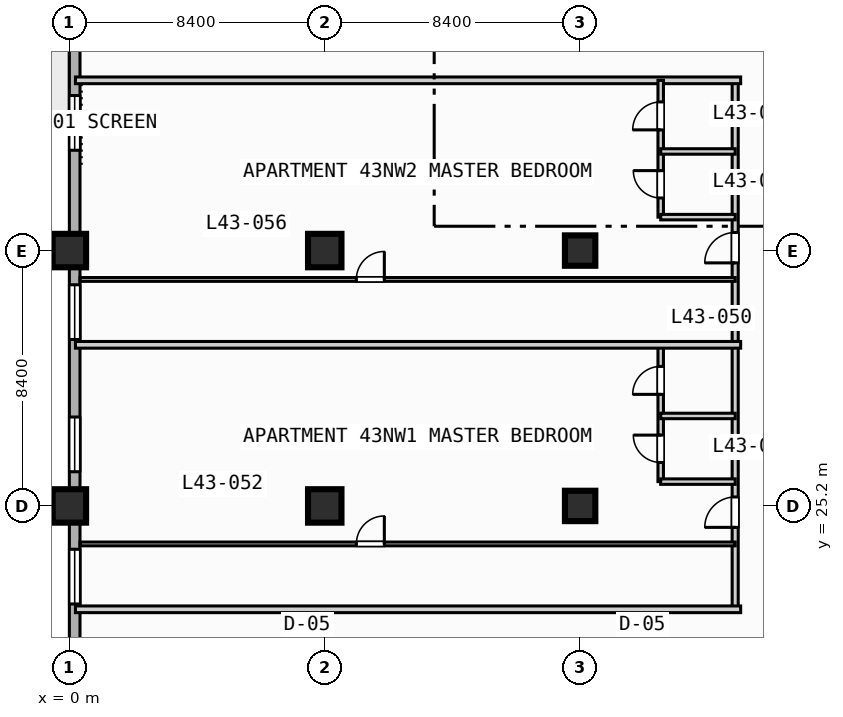
"""IFC4 building model, lengths in metres.
Left out: names, types, materials, properties, quantities, classifications, styles, units other than length and angle.
Written with IfcOpenShell. Run it as: python <this file> out.ifc"""

import sys

from ifc_helpers import new_model, si_unit, direction, frame, frame_2d, origin, origin_2d, place, context, subcontext, project, spatial, rectangle, extrude, element, fill, save


model = new_model("IFC4")
c1 = context("Model", 3, precision=1e-05, world=origin(), true_north=direction((0.0, 1.0)))
c2 = subcontext(c1, "Body", "Model", "MODEL_VIEW")
j1 = project(units=[si_unit("LENGTHUNIT", "METRE"), si_unit("PLANEANGLEUNIT", "RADIAN")], contexts=[c1])
p1 = place(None, origin())
s1 = spatial("IfcSite", under=j1, at=p1, CompositionType="ELEMENT")
p2 = place(p1, origin())
s2 = spatial("IfcBuilding", under=s1, at=p2, CompositionType="ELEMENT")
p3 = place(p2, frame((0.0, 0.0, 179.1)))
s3 = spatial("IfcBuildingStorey", under=s2, at=p3, CompositionType="ELEMENT", Elevation=179.1)
for number, where, z_axis, x_axis in (
    (1, (0.0, 25.2, 0.0), (0.0, 0.0, 1.0), (1.0, 0.0, 0.0)),
    (2, (0.0, 33.6, 0.0), (0.0, 0.0, 1.0), (1.0, 0.0, 0.0)),
    (3, (8.4, 25.2, 0.0), (0.0, 0.0, 1.0), (1.0, 0.0, 0.0)),
    (4, (8.4, 33.6, 0.0), (0.0, 0.0, 1.0), (1.0, 0.0, 0.0)),
):
    element("IfcColumn", number, at=place(p3, frame(where, z_axis=z_axis, x_axis=x_axis)), inside=s3, PredefinedType="COLUMN", context=c2, shape_type="SweptSolid", body=[
        extrude(rectangle(XDim=1.1, YDim=1.1, at=origin_2d()), origin(), (0.0, 0.0, 1.0), 3.7),
    ])
for number, where, z_axis, x_axis in (
    (5, (16.8, 25.2, 0.0), (0.0, 0.0, 1.0), (1.0, 0.0, 0.0)),
    (6, (16.8, 33.6, 0.0), (0.0, 0.0, 1.0), (1.0, 0.0, 0.0)),
):
    element("IfcColumn", number, at=place(p3, frame(where, z_axis=z_axis, x_axis=x_axis)), inside=s3, PredefinedType="COLUMN", context=c2, shape_type="SweptSolid", body=[
        extrude(rectangle(XDim=1.0, YDim=1.0, at=origin_2d()), origin(), (0.0, 0.0, 1.0), 3.7),
    ])
p4 = place(p3, frame((0.175, 3.175, 0.0), z_axis=(0.0, 0.0, 1.0), x_axis=(0.0, 1.0, 0.0)))
e7 = element("IfcWall", 7, at=p4, inside=s3, PredefinedType="STANDARD", context=c2, shape_type="SweptSolid", body=[
    extrude(rectangle(XDim=69.25, YDim=0.35, at=frame_2d((34.625, 0.0))), origin(), (0.0, 0.0, 1.0), 3.47),
])
p5 = place(p4, frame((42.325, 0.0, 0.0)))
e8 = element("IfcOpeningElement", 8, at=p5, cuts=e7, PredefinedType="OPENING", context=c2, shape_type="SweptSolid", body=[
    extrude(rectangle(XDim=1.4, YDim=2.2, at=frame_2d((0.7, 1.1))), frame((0.0, 0.185, 0.0), z_axis=(0.0, -1.0, 0.0), x_axis=(1.0, 0.0, 0.0)), (0.0, 0.0, 1.0), 0.37),
])
p6 = place(p4, frame((33.725, 0.0, 0.85)))
e9 = element("IfcOpeningElement", 9, at=p6, cuts=e7, PredefinedType="OPENING", context=c2, shape_type="SweptSolid", body=[
    extrude(rectangle(XDim=1.8, YDim=1.8, at=frame_2d((0.9, 0.9))), frame((0.0, 0.185, 0.0), z_axis=(0.0, -1.0, 0.0), x_axis=(1.0, 0.0, 0.0)), (0.0, 0.0, 1.0), 0.37),
])
p7 = place(p4, frame((18.8, 0.0, 0.85)))
e10 = element("IfcOpeningElement", 10, at=p7, cuts=e7, PredefinedType="OPENING", context=c2, shape_type="SweptSolid", body=[
    extrude(rectangle(XDim=1.8, YDim=1.8, at=frame_2d((0.9, 0.9))), frame((0.0, 0.185, 0.0), z_axis=(0.0, -1.0, 0.0), x_axis=(1.0, 0.0, 0.0)), (0.0, 0.0, 1.0), 0.37),
])
p8 = place(p4, frame((23.15, 0.0, 0.85)))
e11 = element("IfcOpeningElement", 11, at=p8, cuts=e7, PredefinedType="OPENING", context=c2, shape_type="SweptSolid", body=[
    extrude(rectangle(XDim=1.8, YDim=1.8, at=frame_2d((0.9, 0.9))), frame((0.0, 0.185, 0.0), z_axis=(0.0, -1.0, 0.0), x_axis=(1.0, 0.0, 0.0)), (0.0, 0.0, 1.0), 0.37),
])
p9 = place(p4, frame((27.5, 0.0, 0.85)))
e12 = element("IfcOpeningElement", 12, at=p9, cuts=e7, PredefinedType="OPENING", context=c2, shape_type="SweptSolid", body=[
    extrude(rectangle(XDim=1.8, YDim=1.8, at=frame_2d((0.9, 0.9))), frame((0.0, 0.185, 0.0), z_axis=(0.0, -1.0, 0.0), x_axis=(1.0, 0.0, 0.0)), (0.0, 0.0, 1.0), 0.37),
])
p10 = place(p3, frame((21.9, 21.8, 0.0), z_axis=(0.0, 0.0, 1.0), x_axis=(0.0, 1.0, 0.0)))
e13 = element("IfcWall", 13, at=p10, inside=s3, PredefinedType="PARTITIONING", context=c2, shape_type="SweptSolid", body=[
    extrude(rectangle(XDim=17.4, YDim=0.2, at=frame_2d((8.7, 0.0))), origin(), (0.0, 0.0, 1.0), 3.47),
])
p11 = place(p10, frame((2.695, 0.0, 0.0)))
e14 = element("IfcOpeningElement", 14, at=p11, cuts=e13, PredefinedType="OPENING", context=c2, shape_type="SweptSolid", body=[
    extrude(rectangle(XDim=1.0, YDim=2.15, at=frame_2d((0.5, 1.075))), frame((0.0, 0.11, 0.0), z_axis=(0.0, -1.0, 0.0), x_axis=(1.0, 0.0, 0.0)), (0.0, 0.0, 1.0), 0.22),
])
p12 = place(p10, frame((11.395, 0.0, 0.0)))
e15 = element("IfcOpeningElement", 15, at=p12, cuts=e13, PredefinedType="OPENING", context=c2, shape_type="SweptSolid", body=[
    extrude(rectangle(XDim=1.0, YDim=2.15, at=frame_2d((0.5, 1.075))), frame((0.0, 0.11, 0.0), z_axis=(0.0, -1.0, 0.0), x_axis=(1.0, 0.0, 0.0)), (0.0, 0.0, 1.0), 0.22),
])
p13 = place(p3, frame((0.2, 21.8, 0.0), z_axis=(0.0, 0.0, 1.0), x_axis=(1.0, 0.0, 0.0)))
e16 = element("IfcWall", 16, at=p13, inside=s3, PredefinedType="PARTITIONING", context=c2, shape_type="SweptSolid", body=[
    extrude(rectangle(XDim=21.88, YDim=0.22, at=frame_2d((10.94, 0.0))), origin(), (0.0, 0.0, 1.0), 3.47),
])
p14 = place(p3, frame((19.45, 26.0, 0.0), z_axis=(0.0, 0.0, 1.0), x_axis=(0.0, 1.0, 0.0)))
e17 = element("IfcWall", 17, at=p14, inside=s3, PredefinedType="PLUMBINGWALL", context=c2, shape_type="SweptSolid", body=[
    extrude(rectangle(XDim=4.5, YDim=0.18, at=frame_2d((2.25, 0.0))), origin(), (0.0, 0.0, 1.0), 3.47),
])
p15 = place(p14, frame((0.63, 0.0, 0.0)))
e18 = element("IfcOpeningElement", 18, at=p15, cuts=e17, PredefinedType="OPENING", context=c2, shape_type="SweptSolid", body=[
    extrude(rectangle(XDim=0.9, YDim=2.1, at=frame_2d((0.45, 1.05))), frame((0.0, 0.1, 0.0), z_axis=(0.0, -1.0, 0.0), x_axis=(1.0, 0.0, 0.0)), (0.0, 0.0, 1.0), 0.2),
])
p16 = place(p14, frame((2.87, 0.0, 0.0)))
e19 = element("IfcOpeningElement", 19, at=p16, cuts=e17, PredefinedType="OPENING", context=c2, shape_type="SweptSolid", body=[
    extrude(rectangle(XDim=0.92, YDim=2.1, at=frame_2d((0.46, 1.05))), frame((0.0, 0.1, 0.0), z_axis=(0.0, -1.0, 0.0), x_axis=(1.0, 0.0, 0.0)), (0.0, 0.0, 1.0), 0.2),
])
for number, where, z_axis, x_axis in (
    (20, (19.45, 26.0, 0.0), (0.0, 0.0, 1.0), (1.0, 0.0, 0.0)),
    (21, (19.45, 28.16, 0.0), (0.0, 0.0, 1.0), (1.0, 0.0, 0.0)),
):
    element("IfcWall", number, at=place(p3, frame(where, z_axis=z_axis, x_axis=x_axis)), inside=s3, PredefinedType="PLUMBINGWALL", context=c2, shape_type="SweptSolid", body=[
        extrude(rectangle(XDim=2.45, YDim=0.18, at=frame_2d((1.225, 0.0))), origin(), (0.0, 0.0, 1.0), 3.47),
    ])
p17 = place(p3, frame((0.35, 23.95, 0.0), z_axis=(0.0, 0.0, 1.0), x_axis=(1.0, 0.0, 0.0)))
e22 = element("IfcWall", 22, at=p17, inside=s3, PredefinedType="PARTITIONING", context=c2, shape_type="SweptSolid", body=[
    extrude(rectangle(XDim=21.55, YDim=0.125, at=frame_2d((10.775, 0.0))), origin(), (0.0, 0.0, 1.0), 3.47),
])
p18 = place(p17, frame((9.09, 0.0, 0.0)))
e23 = element("IfcOpeningElement", 23, at=p18, cuts=e22, PredefinedType="OPENING", context=c2, shape_type="SweptSolid", body=[
    extrude(rectangle(XDim=0.92, YDim=2.1, at=frame_2d((0.46, 1.05))), frame((0.0, 0.073, 0.0), z_axis=(0.0, -1.0, 0.0), x_axis=(1.0, 0.0, 0.0)), (0.0, 0.0, 1.0), 0.145),
])
for number, where, z_axis, x_axis in (
    (24, (0.2, 30.5, 0.0), (0.0, 0.0, 1.0), (1.0, 0.0, 0.0)),
    (25, (0.2, 39.2, 0.0), (0.0, 0.0, 1.0), (1.0, 0.0, 0.0)),
):
    element("IfcWall", number, at=place(p3, frame(where, z_axis=z_axis, x_axis=x_axis)), inside=s3, PredefinedType="PARTITIONING", context=c2, shape_type="SweptSolid", body=[
        extrude(rectangle(XDim=21.88, YDim=0.22, at=frame_2d((10.94, 0.0))), origin(), (0.0, 0.0, 1.0), 3.47),
    ])
p19 = place(p3, frame((19.45, 34.7, 0.0), z_axis=(0.0, 0.0, 1.0), x_axis=(0.0, 1.0, 0.0)))
e26 = element("IfcWall", 26, at=p19, inside=s3, PredefinedType="PLUMBINGWALL", context=c2, shape_type="SweptSolid", body=[
    extrude(rectangle(XDim=4.5, YDim=0.18, at=frame_2d((2.25, 0.0))), origin(), (0.0, 0.0, 1.0), 3.47),
])
p20 = place(p19, frame((0.63, 0.0, 0.0)))
e27 = element("IfcOpeningElement", 27, at=p20, cuts=e26, PredefinedType="OPENING", context=c2, shape_type="SweptSolid", body=[
    extrude(rectangle(XDim=0.9, YDim=2.1, at=frame_2d((0.45, 1.05))), frame((0.0, 0.1, 0.0), z_axis=(0.0, -1.0, 0.0), x_axis=(1.0, 0.0, 0.0)), (0.0, 0.0, 1.0), 0.2),
])
p21 = place(p19, frame((2.87, 0.0, 0.0)))
e28 = element("IfcOpeningElement", 28, at=p21, cuts=e26, PredefinedType="OPENING", context=c2, shape_type="SweptSolid", body=[
    extrude(rectangle(XDim=0.92, YDim=2.1, at=frame_2d((0.46, 1.05))), frame((0.0, 0.1, 0.0), z_axis=(0.0, -1.0, 0.0), x_axis=(1.0, 0.0, 0.0)), (0.0, 0.0, 1.0), 0.2),
])
for number, where, z_axis, x_axis in (
    (29, (19.45, 34.7, 0.0), (0.0, 0.0, 1.0), (1.0, 0.0, 0.0)),
    (30, (19.45, 36.86, 0.0), (0.0, 0.0, 1.0), (1.0, 0.0, 0.0)),
):
    element("IfcWall", number, at=place(p3, frame(where, z_axis=z_axis, x_axis=x_axis)), inside=s3, PredefinedType="PLUMBINGWALL", context=c2, shape_type="SweptSolid", body=[
        extrude(rectangle(XDim=2.45, YDim=0.18, at=frame_2d((1.225, 0.0))), origin(), (0.0, 0.0, 1.0), 3.47),
    ])
p22 = place(p3, frame((0.35, 32.65, 0.0), z_axis=(0.0, 0.0, 1.0), x_axis=(1.0, 0.0, 0.0)))
e31 = element("IfcWall", 31, at=p22, inside=s3, PredefinedType="PARTITIONING", context=c2, shape_type="SweptSolid", body=[
    extrude(rectangle(XDim=21.55, YDim=0.125, at=frame_2d((10.775, 0.0))), origin(), (0.0, 0.0, 1.0), 3.47),
])
p23 = place(p22, frame((9.09, 0.0, 0.0)))
e32 = element("IfcOpeningElement", 32, at=p23, cuts=e31, PredefinedType="OPENING", context=c2, shape_type="SweptSolid", body=[
    extrude(rectangle(XDim=0.92, YDim=2.1, at=frame_2d((0.46, 1.05))), frame((0.0, 0.073, 0.0), z_axis=(0.0, -1.0, 0.0), x_axis=(1.0, 0.0, 0.0)), (0.0, 0.0, 1.0), 0.145),
])
p24 = place(p6, origin())
e33 = element("IfcWindow", 33, at=p24, inside=s3, PartitioningType="SINGLE_PANEL", PredefinedType="WINDOW", context=c2, shape_type="SweptSolid", body=[
    extrude(rectangle(XDim=1.8, YDim=1.8, at=frame_2d((0.9, 0.9))), frame((0.0, 0.03, 0.0), z_axis=(0.0, -1.0, 0.0), x_axis=(1.0, 0.0, 0.0)), (0.0, 0.0, 1.0), 0.06),
])
fill(e9, e33)
p25 = place(p7, origin())
e34 = element("IfcWindow", 34, at=p25, inside=s3, PartitioningType="SINGLE_PANEL", PredefinedType="WINDOW", context=c2, shape_type="SweptSolid", body=[
    extrude(rectangle(XDim=1.8, YDim=1.8, at=frame_2d((0.9, 0.9))), frame((0.0, 0.03, 0.0), z_axis=(0.0, -1.0, 0.0), x_axis=(1.0, 0.0, 0.0)), (0.0, 0.0, 1.0), 0.06),
])
fill(e10, e34)
p26 = place(p8, origin())
e35 = element("IfcWindow", 35, at=p26, inside=s3, PartitioningType="SINGLE_PANEL", PredefinedType="WINDOW", context=c2, shape_type="SweptSolid", body=[
    extrude(rectangle(XDim=1.8, YDim=1.8, at=frame_2d((0.9, 0.9))), frame((0.0, 0.03, 0.0), z_axis=(0.0, -1.0, 0.0), x_axis=(1.0, 0.0, 0.0)), (0.0, 0.0, 1.0), 0.06),
])
fill(e11, e35)
p27 = place(p9, origin())
e36 = element("IfcWindow", 36, at=p27, inside=s3, PartitioningType="SINGLE_PANEL", PredefinedType="WINDOW", context=c2, shape_type="SweptSolid", body=[
    extrude(rectangle(XDim=1.8, YDim=1.8, at=frame_2d((0.9, 0.9))), frame((0.0, 0.03, 0.0), z_axis=(0.0, -1.0, 0.0), x_axis=(1.0, 0.0, 0.0)), (0.0, 0.0, 1.0), 0.06),
])
fill(e12, e36)
p28 = place(p11, origin())
e37 = element("IfcDoor", 37, at=p28, inside=s3, OperationType="SINGLE_SWING_LEFT", PredefinedType="DOOR", context=c2, shape_type="SweptSolid", body=[
    extrude(rectangle(XDim=1.0, YDim=2.15, at=frame_2d((0.5, 1.075))), frame((0.0, 0.025, 0.0), z_axis=(0.0, -1.0, 0.0), x_axis=(1.0, 0.0, 0.0)), (0.0, 0.0, 1.0), 0.05),
])
fill(e14, e37)
p29 = place(p12, origin())
e38 = element("IfcDoor", 38, at=p29, inside=s3, OperationType="SINGLE_SWING_LEFT", PredefinedType="DOOR", context=c2, shape_type="SweptSolid", body=[
    extrude(rectangle(XDim=1.0, YDim=2.15, at=frame_2d((0.5, 1.075))), frame((0.0, 0.025, 0.0), z_axis=(0.0, -1.0, 0.0), x_axis=(1.0, 0.0, 0.0)), (0.0, 0.0, 1.0), 0.05),
])
fill(e15, e38)
p30 = place(p15, origin())
e39 = element("IfcDoor", 39, at=p30, inside=s3, OperationType="SINGLE_SWING_RIGHT", PredefinedType="DOOR", context=c2, shape_type="SweptSolid", body=[
    extrude(rectangle(XDim=0.9, YDim=2.1, at=frame_2d((0.45, 1.05))), frame((0.0, 0.025, 0.0), z_axis=(0.0, -1.0, 0.0), x_axis=(1.0, 0.0, 0.0)), (0.0, 0.0, 1.0), 0.05),
])
fill(e18, e39)
p31 = place(p16, origin())
e40 = element("IfcDoor", 40, at=p31, inside=s3, OperationType="SINGLE_SWING_LEFT", PredefinedType="DOOR", context=c2, shape_type="SweptSolid", body=[
    extrude(rectangle(XDim=0.92, YDim=2.1, at=frame_2d((0.46, 1.05))), frame((0.0, 0.025, 0.0), z_axis=(0.0, -1.0, 0.0), x_axis=(1.0, 0.0, 0.0)), (0.0, 0.0, 1.0), 0.05),
])
fill(e19, e40)
p32 = place(p18, origin())
e41 = element("IfcDoor", 41, at=p32, inside=s3, OperationType="SINGLE_SWING_RIGHT", PredefinedType="DOOR", context=c2, shape_type="SweptSolid", body=[
    extrude(rectangle(XDim=0.92, YDim=2.1, at=frame_2d((0.46, 1.05))), frame((0.0, 0.025, 0.0), z_axis=(0.0, -1.0, 0.0), x_axis=(1.0, 0.0, 0.0)), (0.0, 0.0, 1.0), 0.05),
])
fill(e23, e41)
p33 = place(p20, origin())
e42 = element("IfcDoor", 42, at=p33, inside=s3, OperationType="SINGLE_SWING_RIGHT", PredefinedType="DOOR", context=c2, shape_type="SweptSolid", body=[
    extrude(rectangle(XDim=0.9, YDim=2.1, at=frame_2d((0.45, 1.05))), frame((0.0, 0.025, 0.0), z_axis=(0.0, -1.0, 0.0), x_axis=(1.0, 0.0, 0.0)), (0.0, 0.0, 1.0), 0.05),
])
fill(e27, e42)
p34 = place(p21, origin())
e43 = element("IfcDoor", 43, at=p34, inside=s3, OperationType="SINGLE_SWING_LEFT", PredefinedType="DOOR", context=c2, shape_type="SweptSolid", body=[
    extrude(rectangle(XDim=0.92, YDim=2.1, at=frame_2d((0.46, 1.05))), frame((0.0, 0.025, 0.0), z_axis=(0.0, -1.0, 0.0), x_axis=(1.0, 0.0, 0.0)), (0.0, 0.0, 1.0), 0.05),
])
fill(e28, e43)
p35 = place(p23, origin())
e44 = element("IfcDoor", 44, at=p35, inside=s3, OperationType="SINGLE_SWING_RIGHT", PredefinedType="DOOR", context=c2, shape_type="SweptSolid", body=[
    extrude(rectangle(XDim=0.92, YDim=2.1, at=frame_2d((0.46, 1.05))), frame((0.0, 0.025, 0.0), z_axis=(0.0, -1.0, 0.0), x_axis=(1.0, 0.0, 0.0)), (0.0, 0.0, 1.0), 0.05),
])
fill(e32, e44)
save(model, sys.argv[1])
